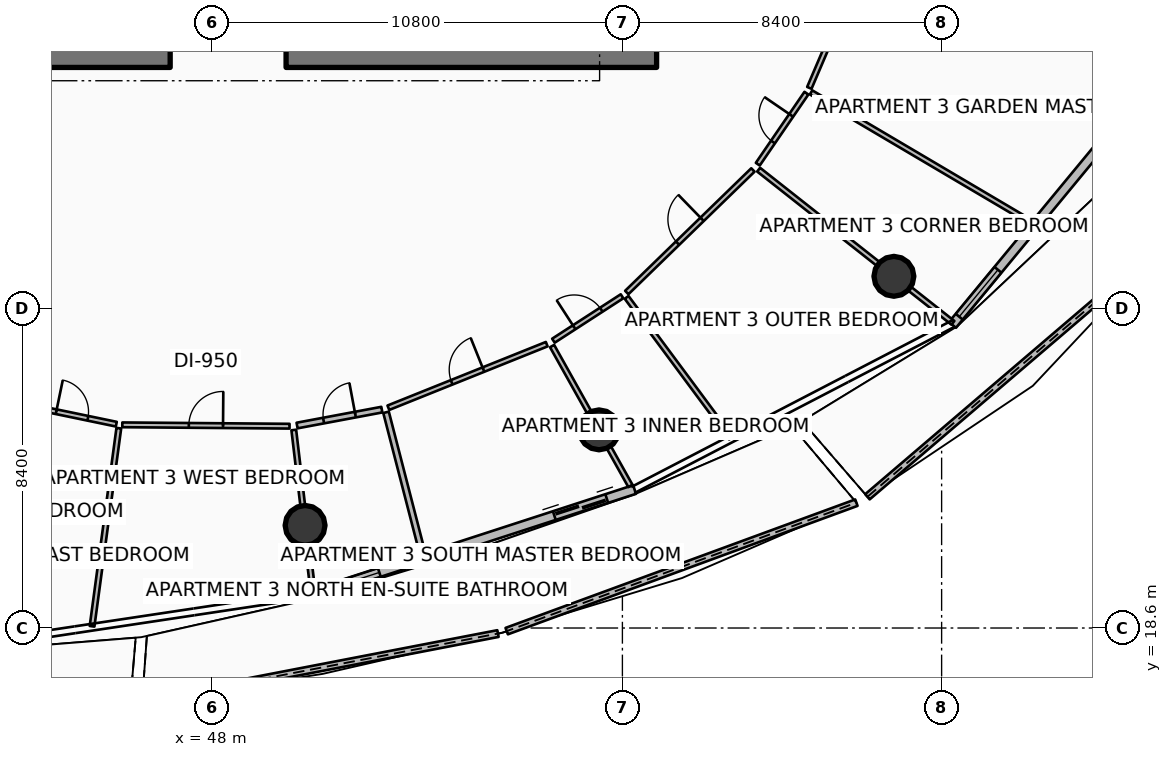
"""IFC4 building model, lengths in metres.
Left out: names, types, materials, properties, quantities, classifications, styles, units other than length and angle.
Written with IfcOpenShell. Run it as: python <this file> out.ifc"""

import sys

from ifc_helpers import new_model, si_unit, direction, frame, frame_2d, origin, origin_2d, place, context, subcontext, project, spatial, polyline, rectangle, circle, outline, extrude, element, fill, save


model = new_model("IFC4")
c1 = context("Model", 3, precision=1e-05, world=origin(), true_north=direction((0.0, 1.0)))
c2 = subcontext(c1, "Body", "Model", "MODEL_VIEW")
j1 = project(units=[si_unit("LENGTHUNIT", "METRE"), si_unit("PLANEANGLEUNIT", "RADIAN")], contexts=[c1])
p1 = place(None, origin())
s1 = spatial("IfcSite", under=j1, at=p1, CompositionType="ELEMENT")
p2 = place(p1, origin())
s2 = spatial("IfcBuilding", under=s1, at=p2, CompositionType="ELEMENT")
p3 = place(p2, frame((0.0, 0.0, 221.55)))
s3 = spatial("IfcBuildingStorey", under=s2, at=p3, CompositionType="ELEMENT", Elevation=221.55)
for number, where, z_axis, x_axis in (
    (1, (37.15, 33.675, 0.0), (0.0, 0.0, 1.0), (1.0, 0.0, 0.0)),
    (2, (49.95, 33.675, 0.0), (0.0, 0.0, 1.0), (1.0, 0.0, 0.0)),
):
    element("IfcWall", number, at=place(p3, frame(where, z_axis=z_axis, x_axis=x_axis)), inside=s3, PredefinedType="SHEAR", context=c2, shape_type="SweptSolid", body=[
        extrude(rectangle(XDim=9.75, YDim=0.65, at=frame_2d((4.875, 0.0))), origin(), (0.0, 0.0, 1.0), 3.75),
    ])
p4 = place(p3, frame((50.45, 21.3, 0.0), z_axis=(0.028660243704, -0.241906104598, 0.969876294683), x_axis=(0.993054664925, 0.117653867213, 0.0)))
e3 = element("IfcColumn", 3, at=p4, inside=s3, PredefinedType="COLUMN", context=c2, shape_type="SweptSolid", body=[
    extrude(circle(Radius=0.525, at=origin_2d()), origin(), (0.0, 0.0, 1.0), 3.578),
])
p5 = place(p3, frame((58.185, 23.814, 0.0), z_axis=(0.119073423667, -0.212626239625, 0.969851329843), x_axis=(0.872501241127, 0.488611895304, 0.0)))
e4 = element("IfcColumn", 4, at=p5, inside=s3, PredefinedType="COLUMN", context=c2, shape_type="SweptSolid", body=[
    extrude(circle(Radius=0.525, at=origin_2d()), origin(), (0.0, 0.0, 1.0), 3.578),
])
p6 = place(p3, frame((65.944, 27.854, 0.0), z_axis=(0.208518335243, -0.164359117207, 0.964109010672), x_axis=(0.619039399449, 0.785359931452, 0.0)))
e5 = element("IfcColumn", 5, at=p6, inside=s3, PredefinedType="COLUMN", context=c2, shape_type="SweptSolid", body=[
    extrude(circle(Radius=0.525, at=origin_2d()), origin(), (0.0, 0.0, 1.0), 3.599),
])
p7 = place(p3, frame((46.161, 16.649, 0.0), z_axis=(0.0, 0.0, 1.0), x_axis=(0.981918699124, 0.189303112259, 0.0)))
e6 = element("IfcWall", 6, at=p7, inside=s3, PredefinedType="PARAPET", context=c2, shape_type="SweptSolid", body=[
    extrude(outline(polyline([(0.0, 0.0), (9.537, 0.0), (9.537, 1.632), (4.769, 1.418), (0.0, 1.233), (0.0, 0.0)])), frame((0.0, 0.09, 0.0), z_axis=(0.0, -1.0, 0.0), x_axis=(1.0, 0.0, 0.0)), (0.0, 0.0, 1.0), 0.18),
])
p8 = place(p3, frame((55.756, 18.518, 0.0), z_axis=(0.0, 0.0, 1.0), x_axis=(0.938669265972, 0.344818806214, 0.0)))
e7 = element("IfcWall", 7, at=p8, inside=s3, PredefinedType="PARAPET", context=c2, shape_type="SweptSolid", body=[
    extrude(outline(polyline([(0.0, 0.0), (9.803, 0.0), (9.802, 1.86), (4.901, 1.798), (0.0, 1.632), (0.0, 0.0)])), frame((0.0, 0.09, 0.0), z_axis=(0.0, -1.0, 0.0), x_axis=(1.0, 0.0, 0.0)), (0.0, 0.0, 1.0), 0.18),
])
p9 = place(p3, frame((65.248, 22.053, 0.0), z_axis=(0.0, 0.0, 1.0), x_axis=(0.760227532438, 0.649656908624, 0.0)))
e8 = element("IfcWall", 8, at=p9, inside=s3, PredefinedType="PARAPET", context=c2, shape_type="SweptSolid", body=[
    extrude(outline(polyline([(0.0, 0.0), (10.64, 0.0), (10.64, 1.632), (5.32, 1.798), (0.0, 1.86), (0.0, 0.0)])), frame((0.0, 0.09, 0.0), z_axis=(0.0, -1.0, 0.0), x_axis=(1.0, 0.0, 0.0)), (0.0, 0.0, 1.0), 0.18),
])
p10 = place(p3, frame((50.616, 19.481, 0.0), z_axis=(0.0, 0.0, 1.0), x_axis=(0.951058543936, 0.309010753869, 0.0)))
e9 = element("IfcWall", 9, at=p10, inside=s3, PredefinedType="SOLIDWALL", context=c2, shape_type="SweptSolid", body=[
    extrude(rectangle(XDim=8.942, YDim=0.24, at=frame_2d((4.471, 0.0))), origin(), (0.0, 0.0, 1.0), 2.42),
])
p11 = place(p10, frame((6.722, 0.0, 0.0)))
e10 = element("IfcOpeningElement", 10, at=p11, cuts=e9, PredefinedType="OPENING", context=c2, shape_type="SweptSolid", body=[
    extrude(rectangle(XDim=1.45, YDim=2.15, at=frame_2d((0.725, 1.075))), frame((0.0, 0.13, 0.0), z_axis=(0.0, -1.0, 0.0), x_axis=(1.0, 0.0, 0.0)), (0.0, 0.0, 1.0), 0.26),
])
p12 = place(p10, frame((0.28, 0.0, 0.65)))
e11 = element("IfcOpeningElement", 11, at=p12, cuts=e9, PredefinedType="OPENING", context=c2, shape_type="SweptSolid", body=[
    extrude(rectangle(XDim=1.6, YDim=1.5, at=frame_2d((0.8, 0.75))), frame((0.0, 0.13, 0.0), z_axis=(0.0, -1.0, 0.0), x_axis=(1.0, 0.0, 0.0)), (0.0, 0.0, 1.0), 0.26),
])
p13 = place(p3, frame((67.485, 26.576, 0.0), z_axis=(0.0, 0.0, 1.0), x_axis=(0.636759394418, 0.771062561418, 0.0)))
e12 = element("IfcWall", 12, at=p13, inside=s3, PredefinedType="SOLIDWALL", context=c2, shape_type="SweptSolid", body=[
    extrude(rectangle(XDim=10.494, YDim=0.24, at=frame_2d((5.247, 0.0))), origin(), (0.0, 0.0, 1.0), 2.42),
])
p14 = place(p13, frame((8.274, 0.0, 0.0)))
e13 = element("IfcOpeningElement", 13, at=p14, cuts=e12, PredefinedType="OPENING", context=c2, shape_type="SweptSolid", body=[
    extrude(rectangle(XDim=1.45, YDim=2.15, at=frame_2d((0.725, 1.075))), frame((0.0, 0.13, 0.0), z_axis=(0.0, -1.0, 0.0), x_axis=(1.0, 0.0, 0.0)), (0.0, 0.0, 1.0), 0.26),
])
p15 = place(p13, frame((0.28, 0.0, 0.65)))
e14 = element("IfcOpeningElement", 14, at=p15, cuts=e12, PredefinedType="OPENING", context=c2, shape_type="SweptSolid", body=[
    extrude(rectangle(XDim=1.6, YDim=1.5, at=frame_2d((0.8, 0.75))), frame((0.0, 0.13, 0.0), z_axis=(0.0, -1.0, 0.0), x_axis=(1.0, 0.0, 0.0)), (0.0, 0.0, 1.0), 0.26),
])
p16 = place(p3, frame((45.549, 23.858, 0.0), z_axis=(0.0, 0.0, 1.0), x_axis=(-0.13386615137, -0.990999421552, 0.0)))
e15 = element("IfcWall", 15, at=p16, inside=s3, PredefinedType="PARTITIONING", context=c2, shape_type="SweptSolid", body=[
    extrude(rectangle(XDim=5.26, YDim=0.125, at=frame_2d((2.63, 0.0))), origin(), (0.0, 0.0, 1.0), 2.445),
])
p17 = place(p3, frame((43.153, 24.447, 0.0), z_axis=(0.0, 0.0, 1.0), x_axis=(0.979138075321, -0.203196037012, 0.0)))
e16 = element("IfcWall", 16, at=p17, inside=s3, PredefinedType="PARTITIONING", context=c2, shape_type="SweptSolid", body=[
    extrude(rectangle(XDim=2.379, YDim=0.125, at=frame_2d((1.189, 0.0))), origin(), (0.0, 0.0, 1.0), 2.427),
])
p18 = place(p17, frame((0.764, 0.0, 0.0)))
e17 = element("IfcOpeningElement", 17, at=p18, cuts=e16, PredefinedType="OPENING", context=c2, shape_type="SweptSolid", body=[
    extrude(rectangle(XDim=0.85, YDim=2.06, at=frame_2d((0.425, 1.03))), frame((0.0, 0.073, 0.0), z_axis=(0.0, -1.0, 0.0), x_axis=(1.0, 0.0, 0.0)), (0.0, 0.0, 1.0), 0.145),
])
p19 = place(p3, frame((45.641, 23.946, 0.0), z_axis=(0.0, 0.0, 1.0), x_axis=(0.999966292936, -0.008210541545, 0.0)))
e18 = element("IfcWall", 18, at=p19, inside=s3, PredefinedType="PARTITIONING", context=c2, shape_type="SweptSolid", body=[
    extrude(rectangle(XDim=4.401, YDim=0.125, at=frame_2d((2.2, 0.0))), origin(), (0.0, 0.0, 1.0), 2.91),
])
p20 = place(p19, frame((1.75, 0.0, 0.0)))
e19 = element("IfcOpeningElement", 19, at=p20, cuts=e18, PredefinedType="OPENING", context=c2, shape_type="SweptSolid", body=[
    extrude(rectangle(XDim=0.9, YDim=2.08, at=frame_2d((0.45, 1.04))), frame((0.0, 0.073, 0.0), z_axis=(0.0, -1.0, 0.0), x_axis=(1.0, 0.0, 0.0)), (0.0, 0.0, 1.0), 0.145),
])
p21 = place(p3, frame((50.153, 23.81, 0.0), z_axis=(0.0, 0.0, 1.0), x_axis=(0.11747756829, -0.993075536376, 0.0)))
e20 = element("IfcWall", 20, at=p21, inside=s3, PredefinedType="PARTITIONING", context=c2, shape_type="SweptSolid", body=[
    extrude(rectangle(XDim=4.318, YDim=0.125, at=frame_2d((2.159, 0.0))), origin(), (0.0, 0.0, 1.0), 2.427),
])
p22 = place(p3, frame((50.24, 23.928, 0.0), z_axis=(0.0, 0.0, 1.0), x_axis=(0.982864877136, 0.184327516371, 0.0)))
e21 = element("IfcWall", 21, at=p22, inside=s3, PredefinedType="PARTITIONING", context=c2, shape_type="SweptSolid", body=[
    extrude(rectangle(XDim=2.269, YDim=0.15, at=frame_2d((1.134, 0.0))), origin(), (0.0, 0.0, 1.0), 2.427),
])
p23 = place(p22, frame((0.709, 0.0, 0.0)))
e22 = element("IfcOpeningElement", 22, at=p23, cuts=e21, PredefinedType="OPENING", context=c2, shape_type="SweptSolid", body=[
    extrude(rectangle(XDim=0.85, YDim=2.06, at=frame_2d((0.425, 1.03))), frame((0.0, 0.085, 0.0), z_axis=(0.0, -1.0, 0.0), x_axis=(1.0, 0.0, 0.0)), (0.0, 0.0, 1.0), 0.17),
])
p24 = place(p3, frame((52.581, 24.275, 0.0), z_axis=(0.0, 0.0, 1.0), x_axis=(0.250197627326, -0.968194787881, 0.0)))
e23 = element("IfcWall", 23, at=p24, inside=s3, PredefinedType="PARTITIONING", context=c2, shape_type="SweptSolid", body=[
    extrude(rectangle(XDim=3.835, YDim=0.15, at=frame_2d((1.917, 0.0))), origin(), (0.0, 0.0, 1.0), 2.445),
])
p25 = place(p3, frame((52.642, 24.396, 0.0), z_axis=(0.0, 0.0, 1.0), x_axis=(0.928022245897, 0.372524779202, 0.0)))
e24 = element("IfcWall", 24, at=p25, inside=s3, PredefinedType="PARTITIONING", context=c2, shape_type="SweptSolid", body=[
    extrude(rectangle(XDim=4.49, YDim=0.125, at=frame_2d((2.245, 0.0))), origin(), (0.0, 0.0, 1.0), 2.427),
])
p26 = place(p25, frame((1.795, 0.0, 0.0)))
e25 = element("IfcOpeningElement", 25, at=p26, cuts=e24, PredefinedType="OPENING", context=c2, shape_type="SweptSolid", body=[
    extrude(rectangle(XDim=0.9, YDim=2.08, at=frame_2d((0.45, 1.04))), frame((0.0, 0.073, 0.0), z_axis=(0.0, -1.0, 0.0), x_axis=(1.0, 0.0, 0.0)), (0.0, 0.0, 1.0), 0.145),
])
p27 = place(p3, frame((56.95, 26.019, 0.0), z_axis=(0.0, 0.0, 1.0), x_axis=(0.488578696185, -0.87251983223, 0.0)))
e26 = element("IfcWall", 26, at=p27, inside=s3, PredefinedType="PARTITIONING", context=c2, shape_type="SweptSolid", body=[
    extrude(rectangle(XDim=4.219, YDim=0.125, at=frame_2d((2.109, 0.0))), origin(), (0.0, 0.0, 1.0), 2.427),
])
p28 = place(p3, frame((58.911, 27.3, 0.0), z_axis=(0.0, 0.0, 1.0), x_axis=(0.596034279856, -0.802958988515, 0.0)))
e27 = element("IfcWall", 27, at=p28, inside=s3, PredefinedType="PARTITIONING", context=c2, shape_type="SweptSolid", body=[
    extrude(rectangle(XDim=4.608, YDim=0.125, at=frame_2d((2.304, 0.0))), origin(), (0.0, 0.0, 1.0), 2.445),
])
p29 = place(p3, frame((56.985, 26.16, 0.0), z_axis=(0.0, 0.0, 1.0), x_axis=(0.839433064988, 0.543463089275, 0.0)))
e28 = element("IfcWall", 28, at=p29, inside=s3, PredefinedType="PARTITIONING", context=c2, shape_type="SweptSolid", body=[
    extrude(rectangle(XDim=2.15, YDim=0.125, at=frame_2d((1.075, 0.0))), origin(), (0.0, 0.0, 1.0), 2.427),
])
p30 = place(p29, frame((0.65, 0.0, 0.0)))
e29 = element("IfcOpeningElement", 29, at=p30, cuts=e28, PredefinedType="OPENING", context=c2, shape_type="SweptSolid", body=[
    extrude(rectangle(XDim=0.85, YDim=2.06, at=frame_2d((0.425, 1.03))), frame((0.0, 0.073, 0.0), z_axis=(0.0, -1.0, 0.0), x_axis=(1.0, 0.0, 0.0)), (0.0, 0.0, 1.0), 0.145),
])
p31 = place(p3, frame((58.915, 27.428, 0.0), z_axis=(0.0, 0.0, 1.0), x_axis=(0.717293694641, 0.696770949185, 0.0)))
e30 = element("IfcWall", 30, at=p31, inside=s3, PredefinedType="PARTITIONING", context=c2, shape_type="SweptSolid", body=[
    extrude(rectangle(XDim=4.628, YDim=0.125, at=frame_2d((2.314, 0.0))), origin(), (0.0, 0.0, 1.0), 2.427),
])
p32 = place(p31, frame((1.864, 0.0, 0.0)))
e31 = element("IfcOpeningElement", 31, at=p32, cuts=e30, PredefinedType="OPENING", context=c2, shape_type="SweptSolid", body=[
    extrude(rectangle(XDim=0.9, YDim=2.08, at=frame_2d((0.45, 1.04))), frame((0.0, 0.073, 0.0), z_axis=(0.0, -1.0, 0.0), x_axis=(1.0, 0.0, 0.0)), (0.0, 0.0, 1.0), 0.145),
])
p33 = place(p3, frame((62.385, 30.66, 0.0), z_axis=(0.0, 0.0, 1.0), x_axis=(0.785323159094, -0.619086048777, 0.0)))
e32 = element("IfcWall", 32, at=p33, inside=s3, PredefinedType="PARTITIONING", context=c2, shape_type="SweptSolid", body=[
    extrude(rectangle(XDim=6.51, YDim=0.125, at=frame_2d((3.255, 0.0))), origin(), (0.0, 0.0, 1.0), 2.427),
])
p34 = place(p3, frame((63.765, 32.693, 0.0), z_axis=(0.0, 0.0, 1.0), x_axis=(0.861146221638, -0.508357339829, 0.0)))
e33 = element("IfcWall", 33, at=p34, inside=s3, PredefinedType="PARTITIONING", context=c2, shape_type="SweptSolid", body=[
    extrude(rectangle(XDim=6.723, YDim=0.125, at=frame_2d((3.362, 0.0))), origin(), (0.0, 0.0, 1.0), 2.445),
])
p35 = place(p3, frame((62.363, 30.804, 0.0), z_axis=(0.0, 0.0, 1.0), x_axis=(0.564981448435, 0.825103607388, 0.0)))
e34 = element("IfcWall", 34, at=p35, inside=s3, PredefinedType="PARTITIONING", context=c2, shape_type="SweptSolid", body=[
    extrude(rectangle(XDim=2.265, YDim=0.125, at=frame_2d((1.132, 0.0))), origin(), (0.0, 0.0, 1.0), 2.427),
])
p36 = place(p35, frame((0.708, 0.0, 0.0)))
e35 = element("IfcOpeningElement", 35, at=p36, cuts=e34, PredefinedType="OPENING", context=c2, shape_type="SweptSolid", body=[
    extrude(rectangle(XDim=0.85, YDim=2.06, at=frame_2d((0.425, 1.03))), frame((0.0, 0.073, 0.0), z_axis=(0.0, -1.0, 0.0), x_axis=(1.0, 0.0, 0.0)), (0.0, 0.0, 1.0), 0.145),
])
p37 = place(p3, frame((63.719, 32.813, 0.0), z_axis=(0.0, 0.0, 1.0), x_axis=(0.393135871469, 0.91948038944, 0.0)))
e36 = element("IfcWall", 36, at=p37, inside=s3, PredefinedType="PARTITIONING", context=c2, shape_type="SweptSolid", body=[
    extrude(rectangle(XDim=4.514, YDim=0.125, at=frame_2d((2.257, 0.0))), origin(), (0.0, 0.0, 1.0), 2.427),
])
p38 = place(p37, frame((1.807, 0.0, 0.0)))
e37 = element("IfcOpeningElement", 37, at=p38, cuts=e36, PredefinedType="OPENING", context=c2, shape_type="SweptSolid", body=[
    extrude(rectangle(XDim=0.9, YDim=2.08, at=frame_2d((0.45, 1.04))), frame((0.0, 0.073, 0.0), z_axis=(0.0, -1.0, 0.0), x_axis=(1.0, 0.0, 0.0)), (0.0, 0.0, 1.0), 0.145),
])
p39 = place(p11, origin())
e38 = element("IfcDoor", 38, at=p39, inside=s3, OperationType="DOUBLE_DOOR_SLIDING", PredefinedType="DOOR", context=c2, shape_type="SweptSolid", body=[
    extrude(rectangle(XDim=1.45, YDim=2.15, at=frame_2d((0.725, 1.075))), frame((0.0, 0.025, 0.0), z_axis=(0.0, -1.0, 0.0), x_axis=(1.0, 0.0, 0.0)), (0.0, 0.0, 1.0), 0.05),
])
fill(e10, e38)
p40 = place(p12, origin())
e39 = element("IfcWindow", 39, at=p40, inside=s3, PartitioningType="SINGLE_PANEL", PredefinedType="WINDOW", context=c2, shape_type="SweptSolid", body=[
    extrude(rectangle(XDim=1.6, YDim=1.5, at=frame_2d((0.8, 0.75))), frame((0.0, 0.03, 0.0), z_axis=(0.0, -1.0, 0.0), x_axis=(1.0, 0.0, 0.0)), (0.0, 0.0, 1.0), 0.06),
])
fill(e11, e39)
p41 = place(p15, origin())
e40 = element("IfcWindow", 40, at=p41, inside=s3, PartitioningType="SINGLE_PANEL", PredefinedType="WINDOW", context=c2, shape_type="SweptSolid", body=[
    extrude(rectangle(XDim=1.6, YDim=1.5, at=frame_2d((0.8, 0.75))), frame((0.0, 0.03, 0.0), z_axis=(0.0, -1.0, 0.0), x_axis=(1.0, 0.0, 0.0)), (0.0, 0.0, 1.0), 0.06),
])
fill(e14, e40)
p42 = place(p18, origin())
e41 = element("IfcDoor", 41, at=p42, inside=s3, OperationType="SINGLE_SWING_LEFT", PredefinedType="DOOR", context=c2, shape_type="SweptSolid", body=[
    extrude(rectangle(XDim=0.85, YDim=2.06, at=frame_2d((0.425, 1.03))), frame((0.0, 0.025, 0.0), z_axis=(0.0, -1.0, 0.0), x_axis=(1.0, 0.0, 0.0)), (0.0, 0.0, 1.0), 0.05),
])
fill(e17, e41)
p43 = place(p20, origin())
e42 = element("IfcDoor", 42, at=p43, inside=s3, OperationType="SINGLE_SWING_RIGHT", PredefinedType="DOOR", context=c2, shape_type="SweptSolid", body=[
    extrude(rectangle(XDim=0.9, YDim=2.08, at=frame_2d((0.45, 1.04))), frame((0.0, 0.025, 0.0), z_axis=(0.0, -1.0, 0.0), x_axis=(1.0, 0.0, 0.0)), (0.0, 0.0, 1.0), 0.05),
])
fill(e19, e42)
p44 = place(p23, origin())
e43 = element("IfcDoor", 43, at=p44, inside=s3, OperationType="SINGLE_SWING_RIGHT", PredefinedType="DOOR", context=c2, shape_type="SweptSolid", body=[
    extrude(rectangle(XDim=0.85, YDim=2.06, at=frame_2d((0.425, 1.03))), frame((0.0, 0.025, 0.0), z_axis=(0.0, -1.0, 0.0), x_axis=(1.0, 0.0, 0.0)), (0.0, 0.0, 1.0), 0.05),
])
fill(e22, e43)
p45 = place(p26, origin())
e44 = element("IfcDoor", 44, at=p45, inside=s3, OperationType="SINGLE_SWING_RIGHT", PredefinedType="DOOR", context=c2, shape_type="SweptSolid", body=[
    extrude(rectangle(XDim=0.9, YDim=2.08, at=frame_2d((0.45, 1.04))), frame((0.0, 0.025, 0.0), z_axis=(0.0, -1.0, 0.0), x_axis=(1.0, 0.0, 0.0)), (0.0, 0.0, 1.0), 0.05),
])
fill(e25, e44)
p46 = place(p30, origin())
e45 = element("IfcDoor", 45, at=p46, inside=s3, OperationType="SINGLE_SWING_LEFT", PredefinedType="DOOR", context=c2, shape_type="SweptSolid", body=[
    extrude(rectangle(XDim=0.85, YDim=2.06, at=frame_2d((0.425, 1.03))), frame((0.0, 0.025, 0.0), z_axis=(0.0, -1.0, 0.0), x_axis=(1.0, 0.0, 0.0)), (0.0, 0.0, 1.0), 0.05),
])
fill(e29, e45)
p47 = place(p32, origin())
e46 = element("IfcDoor", 46, at=p47, inside=s3, OperationType="SINGLE_SWING_RIGHT", PredefinedType="DOOR", context=c2, shape_type="SweptSolid", body=[
    extrude(rectangle(XDim=0.9, YDim=2.08, at=frame_2d((0.45, 1.04))), frame((0.0, 0.025, 0.0), z_axis=(0.0, -1.0, 0.0), x_axis=(1.0, 0.0, 0.0)), (0.0, 0.0, 1.0), 0.05),
])
fill(e31, e46)
p48 = place(p36, origin())
e47 = element("IfcDoor", 47, at=p48, inside=s3, OperationType="SINGLE_SWING_RIGHT", PredefinedType="DOOR", context=c2, shape_type="SweptSolid", body=[
    extrude(rectangle(XDim=0.85, YDim=2.06, at=frame_2d((0.425, 1.03))), frame((0.0, 0.025, 0.0), z_axis=(0.0, -1.0, 0.0), x_axis=(1.0, 0.0, 0.0)), (0.0, 0.0, 1.0), 0.05),
])
fill(e35, e47)
save(model, sys.argv[1])
